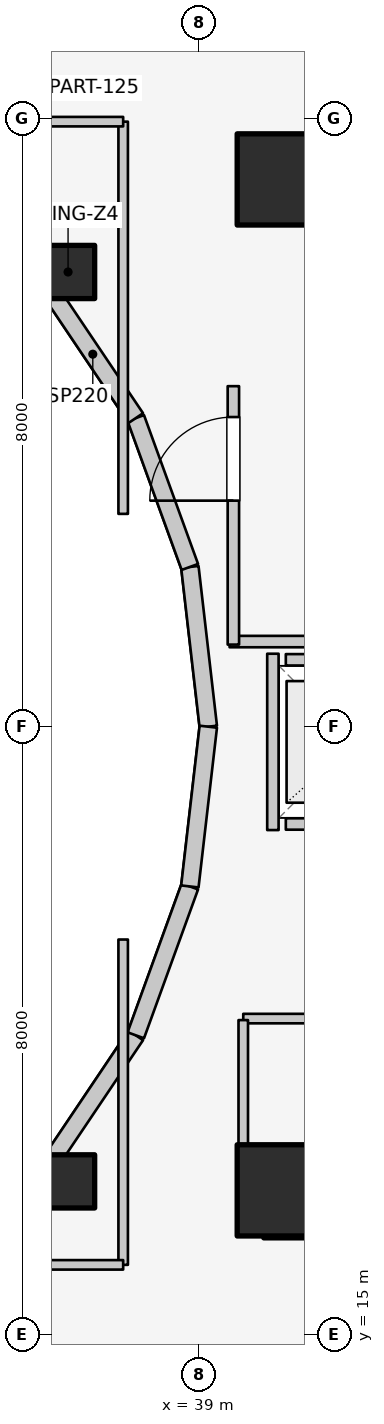
"""IFC4 building model, lengths in metres.
Left out: names, types, materials, properties, quantities, classifications, styles, units other than length and angle.
Written with IfcOpenShell. Run it as: python <this file> out.ifc"""

import sys

from ifc_helpers import new_model, si_unit, direction, frame, frame_2d, origin, origin_2d, place, context, subcontext, project, spatial, rectangle, extrude, element, fill, save


model = new_model("IFC4")
c1 = context("Model", 3, precision=1e-05, world=origin(), true_north=direction((0.0, 1.0)))
c2 = subcontext(c1, "Body", "Model", "MODEL_VIEW")
j1 = project(units=[si_unit("LENGTHUNIT", "METRE"), si_unit("PLANEANGLEUNIT", "RADIAN")], contexts=[c1])
p1 = place(None, origin())
s1 = spatial("IfcSite", under=j1, at=p1, CompositionType="ELEMENT")
p2 = place(p1, origin())
s2 = spatial("IfcBuilding", under=s1, at=p2, CompositionType="ELEMENT")
p3 = place(p2, frame((0.0, 0.0, 217.1)))
s3 = spatial("IfcBuildingStorey", under=s2, at=p3, CompositionType="ELEMENT", Elevation=217.1)
for number, where, z_axis, x_axis in (
    (1, (39.85, 16.55, 0.0), (0.0, 0.0, 1.0), (1.0, 0.0, 0.0)),
    (2, (39.85, 30.35, 0.0), (0.0, 0.0, 1.0), (1.0, 0.0, 0.0)),
):
    element("IfcWall", number, at=place(p3, frame(where, z_axis=z_axis, x_axis=x_axis)), inside=s3, PredefinedType="SHEAR", context=c2, shape_type="SweptSolid", body=[
        extrude(rectangle(XDim=4.5, YDim=0.55, at=frame_2d((2.25, 0.0))), origin(), (0.0, 0.0, 1.0), 3.1),
    ])
for number, where, z_axis, x_axis in (
    (3, (40.1, 16.9, 0.0), (0.0, 0.0, 1.0), (1.0, 0.0, 0.0)),
    (4, (40.1, 30.2, 0.0), (0.0, 0.0, 1.0), (1.0, 0.0, 0.0)),
):
    element("IfcColumn", number, at=place(p3, frame(where, z_axis=z_axis, x_axis=x_axis)), inside=s3, PredefinedType="COLUMN", context=c2, shape_type="SweptSolid", body=[
        extrude(rectangle(XDim=1.2, YDim=1.2, at=origin_2d()), origin(), (0.0, 0.0, 1.0), 3.1),
    ])
for number, where, z_axis, x_axis in (
    (5, (37.275, 28.982, 0.0), (0.0, 0.0, 1.0), (1.0, 0.0, 0.0)),
    (6, (37.275, 17.018, 0.0), (0.0, 0.0, 1.0), (1.0, 0.0, 0.0)),
):
    element("IfcColumn", number, at=place(p3, frame(where, z_axis=z_axis, x_axis=x_axis)), inside=s3, PredefinedType="COLUMN", context=c2, shape_type="SweptSolid", body=[
        extrude(rectangle(XDim=0.7, YDim=0.7, at=origin_2d()), origin(), (0.0, 0.0, 1.0), 3.1),
    ])
p4 = place(p3, frame((39.12, 23.0, 0.0), z_axis=(0.0, 0.0, 1.0), x_axis=(-0.114711713601, 0.993398823617, 0.0)))
e7 = element("IfcWall", 7, at=p4, inside=s3, PredefinedType="STANDARD", context=c2, shape_type="SweptSolid", body=[
    extrude(rectangle(XDim=2.115, YDim=0.23, at=frame_2d((1.058, 0.0))), origin(), (0.0, 0.0, 1.0), 2.56),
])
p5 = place(p3, frame((38.877, 25.102, 0.0), z_axis=(0.0, 0.0, 1.0), x_axis=(-0.341423187295, 0.93990968033, 0.0)))
e8 = element("IfcWall", 8, at=p5, inside=s3, PredefinedType="STANDARD", context=c2, shape_type="SweptSolid", body=[
    extrude(rectangle(XDim=2.084, YDim=0.23, at=frame_2d((1.042, 0.0))), origin(), (0.0, 0.0, 1.0), 2.56),
])
p6 = place(p3, frame((38.166, 27.06, 0.0), z_axis=(0.0, 0.0, 1.0), x_axis=(-0.558197800898, 0.829707909492, 0.0)))
e9 = element("IfcWall", 9, at=p6, inside=s3, PredefinedType="STANDARD", context=c2, shape_type="SweptSolid", body=[
    extrude(rectangle(XDim=2.027, YDim=0.23, at=frame_2d((1.013, 0.0))), origin(), (0.0, 0.0, 1.0), 1.22),
])
for number, where, z_axis, x_axis in (
    (10, (37.035, 28.742, 0.0), (0.0, 0.0, 1.0), (-0.753, 0.659, 0.0)),
    (11, (35.56, 15.968, 0.0), (0.0, 0.0, 1.0), (0.753, 0.659, 0.0)),
):
    element("IfcWall", number, at=place(p3, frame(where, z_axis=z_axis, x_axis=x_axis)), inside=s3, PredefinedType="STANDARD", context=c2, shape_type="SweptSolid", body=[
        extrude(rectangle(XDim=1.959, YDim=0.23, at=frame_2d((0.98, 0.0))), origin(), (0.0, 0.0, 1.0), 1.22),
    ])
p7 = place(p3, frame((37.035, 17.258, 0.0), z_axis=(0.0, 0.0, 1.0), x_axis=(0.558197800898, 0.829707909492, 0.0)))
e12 = element("IfcWall", 12, at=p7, inside=s3, PredefinedType="STANDARD", context=c2, shape_type="SweptSolid", body=[
    extrude(rectangle(XDim=2.027, YDim=0.23, at=frame_2d((1.013, 0.0))), origin(), (0.0, 0.0, 1.0), 1.22),
])
p8 = place(p3, frame((38.166, 18.94, 0.0), z_axis=(0.0, 0.0, 1.0), x_axis=(0.341423187295, 0.93990968033, 0.0)))
e13 = element("IfcWall", 13, at=p8, inside=s3, PredefinedType="STANDARD", context=c2, shape_type="SweptSolid", body=[
    extrude(rectangle(XDim=2.084, YDim=0.23, at=frame_2d((1.042, 0.0))), origin(), (0.0, 0.0, 1.0), 2.56),
])
p9 = place(p3, frame((38.877, 20.898, 0.0), z_axis=(0.0, 0.0, 1.0), x_axis=(0.114711713601, 0.993398823617, 0.0)))
e14 = element("IfcWall", 14, at=p9, inside=s3, PredefinedType="STANDARD", context=c2, shape_type="SweptSolid", body=[
    extrude(rectangle(XDim=2.115, YDim=0.23, at=frame_2d((1.058, 0.0))), origin(), (0.0, 0.0, 1.0), 2.56),
])
p10 = place(p3, frame((40.14, 21.72, 0.0), z_axis=(0.0, 0.0, 1.0), x_axis=(1.0, 0.0, 0.0)))
e15 = element("IfcWall", 15, at=p10, inside=s3, PredefinedType="SOLIDWALL", context=c2, shape_type="SweptSolid", body=[
    extrude(rectangle(XDim=1.82, YDim=0.15, at=frame_2d((0.91, 0.0))), origin(), (0.0, 0.0, 1.0), 2.12),
])
p11 = place(p10, frame((0.36, 0.0, 0.0)))
e16 = element("IfcOpeningElement", 16, at=p11, cuts=e15, PredefinedType="OPENING", context=c2, shape_type="SweptSolid", body=[
    extrude(rectangle(XDim=1.1, YDim=2.1, at=frame_2d((0.55, 1.05))), frame((0.0, 0.085, 0.0), z_axis=(0.0, -1.0, 0.0), x_axis=(1.0, 0.0, 0.0)), (0.0, 0.0, 1.0), 0.17),
])
p12 = place(p3, frame((40.14, 23.88, 0.0), z_axis=(0.0, 0.0, 1.0), x_axis=(1.0, 0.0, 0.0)))
e17 = element("IfcWall", 17, at=p12, inside=s3, PredefinedType="SOLIDWALL", context=c2, shape_type="SweptSolid", body=[
    extrude(rectangle(XDim=1.82, YDim=0.15, at=frame_2d((0.91, 0.0))), origin(), (0.0, 0.0, 1.0), 2.12),
])
p13 = place(p3, frame((39.97, 21.64, 0.0), z_axis=(0.0, 0.0, 1.0), x_axis=(0.0, 1.0, 0.0)))
e18 = element("IfcWall", 18, at=p13, inside=s3, PredefinedType="SOLIDWALL", context=c2, shape_type="SweptSolid", body=[
    extrude(rectangle(XDim=2.32, YDim=0.15, at=frame_2d((1.16, 0.0))), origin(), (0.0, 0.0, 1.0), 2.12),
])
p14 = place(p3, frame((39.4, 24.12, 0.0), z_axis=(0.0, 0.0, 1.0), x_axis=(1.0, 0.0, 0.0)))
e19 = element("IfcWall", 19, at=p14, inside=s3, PredefinedType="PARTITIONING", context=c2, shape_type="SweptSolid", body=[
    extrude(rectangle(XDim=5.08, YDim=0.15, at=frame_2d((2.54, 0.0))), origin(), (0.0, 0.0, 1.0), 2.12),
])
p15 = place(p3, frame((39.45, 24.08, 0.0), z_axis=(0.0, 0.0, 1.0), x_axis=(0.0, 1.0, 0.0)))
e20 = element("IfcWall", 20, at=p15, inside=s3, PredefinedType="PARTITIONING", context=c2, shape_type="SweptSolid", body=[
    extrude(rectangle(XDim=3.4, YDim=0.15, at=frame_2d((1.7, 0.0))), origin(), (0.0, 0.0, 1.0), 2.575),
])
p16 = place(p15, frame((1.894, 0.0, 0.0)))
e21 = element("IfcOpeningElement", 21, at=p16, cuts=e20, PredefinedType="OPENING", context=c2, shape_type="SweptSolid", body=[
    extrude(rectangle(XDim=1.1, YDim=2.1, at=frame_2d((0.55, 1.05))), frame((0.0, 0.085, 0.0), z_axis=(0.0, -1.0, 0.0), x_axis=(1.0, 0.0, 0.0)), (0.0, 0.0, 1.0), 0.17),
])
p17 = place(p3, frame((39.58, 19.16, 0.0), z_axis=(0.0, 0.0, 1.0), x_axis=(1.0, 0.0, 0.0)))
e22 = element("IfcWall", 22, at=p17, inside=s3, PredefinedType="PARTITIONING", context=c2, shape_type="SweptSolid", body=[
    extrude(rectangle(XDim=4.87, YDim=0.125, at=frame_2d((2.435, 0.0))), origin(), (0.0, 0.0, 1.0), 2.12),
])
p18 = place(p17, frame((1.748, 0.0, 0.0)))
e23 = element("IfcOpeningElement", 23, at=p18, cuts=e22, PredefinedType="OPENING", context=c2, shape_type="SweptSolid", body=[
    extrude(rectangle(XDim=0.85, YDim=2.05, at=frame_2d((0.425, 1.025))), frame((0.0, 0.073, 0.0), z_axis=(0.0, -1.0, 0.0), x_axis=(1.0, 0.0, 0.0)), (0.0, 0.0, 1.0), 0.145),
])
p19 = place(p3, frame((39.58, 17.1, 0.0), z_axis=(0.0, 0.0, 1.0), x_axis=(0.0, 1.0, 0.0)))
e24 = element("IfcWall", 24, at=p19, inside=s3, PredefinedType="PARTITIONING", context=c2, shape_type="SweptSolid", body=[
    extrude(rectangle(XDim=2.04, YDim=0.125, at=frame_2d((1.02, 0.0))), origin(), (0.0, 0.0, 1.0), 1.952),
])
p20 = place(p3, frame((35.55, 30.015, 0.0), z_axis=(0.0, 0.0, 1.0), x_axis=(0.522763432117, 0.852477796802, 0.0)))
e25 = element("IfcWall", 25, at=p20, inside=s3, PredefinedType="PARTITIONING", context=c2, shape_type="SweptSolid", body=[
    extrude(rectangle(XDim=3.269, YDim=0.125, at=frame_2d((1.635, 0.0))), origin(), (0.0, 0.0, 1.0), 1.22),
])
p21 = place(p3, frame((35.55, 15.985, 0.0), z_axis=(0.0, 0.0, 1.0), x_axis=(0.52592395012, -0.850531597702, 0.0)))
e26 = element("IfcWall", 26, at=p21, inside=s3, PredefinedType="PARTITIONING", context=c2, shape_type="SweptSolid", body=[
    extrude(rectangle(XDim=2.869, YDim=0.125, at=frame_2d((1.435, 0.0))), origin(), (0.0, 0.0, 1.0), 1.22),
])
p22 = place(p3, frame((38.0, 25.8, 0.0), z_axis=(0.0, 0.0, 1.0), x_axis=(0.0, 1.0, 0.0)))
e27 = element("IfcWall", 27, at=p22, inside=s3, PredefinedType="PARTITIONING", context=c2, shape_type="SweptSolid", body=[
    extrude(rectangle(XDim=5.16, YDim=0.125, at=frame_2d((2.58, 0.0))), origin(), (0.0, 0.0, 1.0), 1.952),
])
p23 = place(p3, frame((35.4, 30.96, 0.0), z_axis=(0.0, 0.0, 1.0), x_axis=(1.0, 0.0, 0.0)))
e28 = element("IfcWall", 28, at=p23, inside=s3, PredefinedType="PARTITIONING", context=c2, shape_type="SweptSolid", body=[
    extrude(rectangle(XDim=2.6, YDim=0.125, at=frame_2d((1.3, 0.0))), origin(), (0.0, 0.0, 1.0), 1.22),
])
p24 = place(p3, frame((38.0, 15.92, 0.0), z_axis=(0.0, 0.0, 1.0), x_axis=(0.0, 1.0, 0.0)))
e29 = element("IfcWall", 29, at=p24, inside=s3, PredefinedType="PARTITIONING", context=c2, shape_type="SweptSolid", body=[
    extrude(rectangle(XDim=4.28, YDim=0.125, at=frame_2d((2.14, 0.0))), origin(), (0.0, 0.0, 1.0), 1.22),
])
p25 = place(p3, frame((35.4, 15.92, 0.0), z_axis=(0.0, 0.0, 1.0), x_axis=(1.0, 0.0, 0.0)))
e30 = element("IfcWall", 30, at=p25, inside=s3, PredefinedType="PARTITIONING", context=c2, shape_type="SweptSolid", body=[
    extrude(rectangle(XDim=2.6, YDim=0.125, at=frame_2d((1.3, 0.0))), origin(), (0.0, 0.0, 1.0), 1.22),
])
p26 = place(p16, origin())
e31 = element("IfcDoor", 31, at=p26, inside=s3, OperationType="SINGLE_SWING_LEFT", PredefinedType="DOOR", context=c2, shape_type="SweptSolid", body=[
    extrude(rectangle(XDim=1.1, YDim=2.1, at=frame_2d((0.55, 1.05))), frame((0.0, 0.025, 0.0), z_axis=(0.0, -1.0, 0.0), x_axis=(1.0, 0.0, 0.0)), (0.0, 0.0, 1.0), 0.05),
])
fill(e21, e31)
save(model, sys.argv[1])
